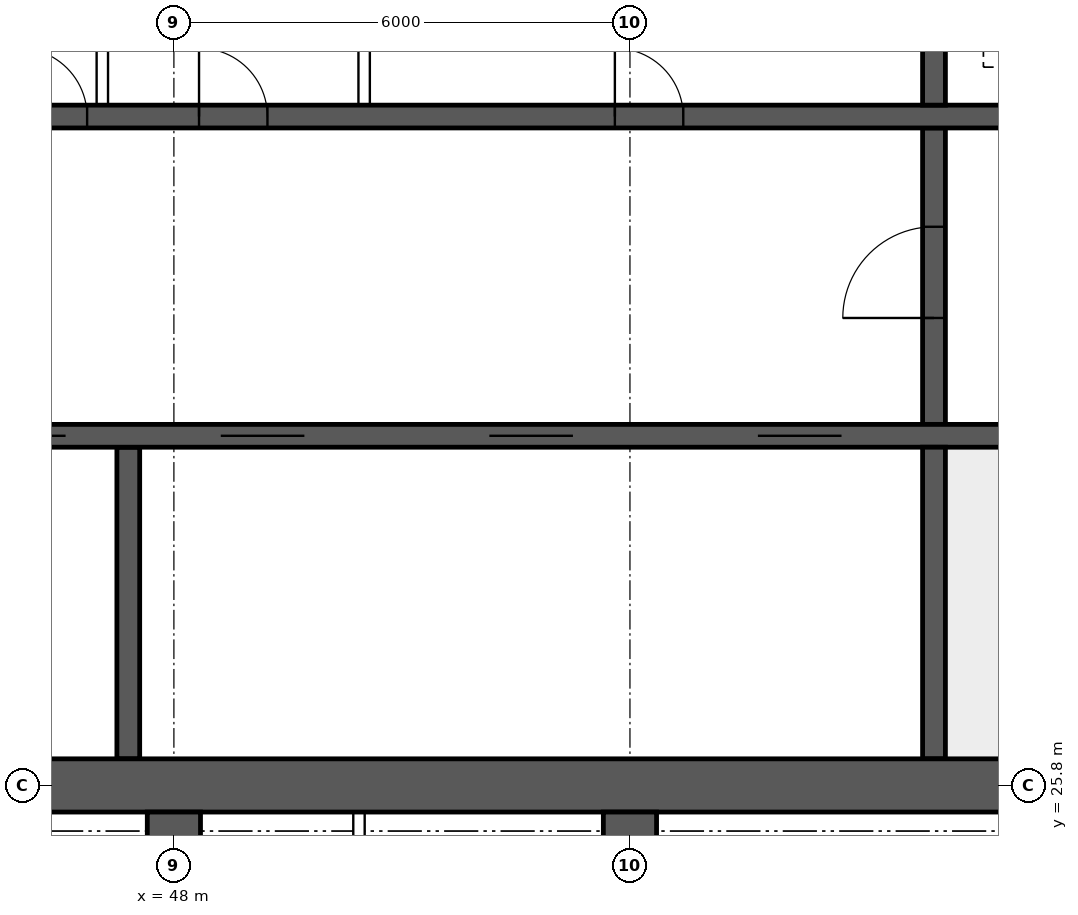
"""IFC4 building model, lengths in metres.
Left out: names, types, materials, properties, quantities, classifications, styles, units other than length and angle.
Written with IfcOpenShell. Run it as: python <this file> out.ifc"""

import sys

from ifc_helpers import new_model, si_unit, direction, frame, frame_2d, origin, place, context, subcontext, project, spatial, rectangle, extrude, element, fill, save


model = new_model("IFC4")
c1 = context("Model", 3, precision=1e-05, world=origin(), true_north=direction((0.0, 1.0)))
c2 = subcontext(c1, "Body", "Model", "MODEL_VIEW")
j1 = project(units=[si_unit("LENGTHUNIT", "METRE"), si_unit("PLANEANGLEUNIT", "RADIAN")], contexts=[c1])
p1 = place(None, origin())
s1 = spatial("IfcSite", under=j1, at=p1, CompositionType="ELEMENT")
p2 = place(p1, origin())
s2 = spatial("IfcBuilding", under=s1, at=p2, CompositionType="ELEMENT")
p3 = place(p2, frame((0.0, 0.0, 208.3)))
s3 = spatial("IfcBuildingStorey", under=s2, at=p3, CompositionType="ELEMENT", Elevation=208.3)
p4 = place(p3, frame((18.0, 25.8, 0.0), z_axis=(0.0, 0.0, 1.0), x_axis=(1.0, 0.0, 0.0)))
e1 = element("IfcWall", 1, at=p4, inside=s3, PredefinedType="SHEAR", context=c2, shape_type="SweptSolid", body=[
    extrude(rectangle(XDim=48.0, YDim=0.7, at=frame_2d((24.0, 0.0))), origin(), (0.0, 0.0, 1.0), 4.5),
])
p5 = place(p3, frame((18.35, 30.4, 0.0), z_axis=(0.0, 0.0, 1.0), x_axis=(1.0, 0.0, 0.0)))
e2 = element("IfcWall", 2, at=p5, inside=s3, PredefinedType="SHEAR", context=c2, shape_type="SweptSolid", body=[
    extrude(rectangle(XDim=47.3, YDim=0.3, at=frame_2d((23.65, 0.0))), origin(), (0.0, 0.0, 1.0), 4.5),
])
p6 = place(p5, frame((0.4, 0.0, 0.0)))
e3 = element("IfcOpeningElement", 3, at=p6, cuts=e2, PredefinedType="OPENING", context=c2, shape_type="SweptSolid", body=[
    extrude(rectangle(XDim=1.0, YDim=2.1, at=frame_2d((0.5, 1.05))), frame((0.0, 0.16, 0.0), z_axis=(0.0, -1.0, 0.0), x_axis=(1.0, 0.0, 0.0)), (0.0, 0.0, 1.0), 0.32),
])
p7 = place(p5, frame((45.9, 0.0, 0.0)))
e4 = element("IfcOpeningElement", 4, at=p7, cuts=e2, PredefinedType="OPENING", context=c2, shape_type="SweptSolid", body=[
    extrude(rectangle(XDim=1.0, YDim=2.1, at=frame_2d((0.5, 1.05))), frame((0.0, 0.16, 0.0), z_axis=(0.0, -1.0, 0.0), x_axis=(1.0, 0.0, 0.0)), (0.0, 0.0, 1.0), 0.32),
])
p8 = place(p5, frame((8.4, 0.0, 0.0)))
e5 = element("IfcOpeningElement", 5, at=p8, cuts=e2, PredefinedType="OPENING", context=c2, shape_type="SweptSolid", body=[
    extrude(rectangle(XDim=1.1, YDim=2.1, at=frame_2d((0.55, 1.05))), frame((0.0, 0.16, 0.0), z_axis=(0.0, -1.0, 0.0), x_axis=(1.0, 0.0, 0.0)), (0.0, 0.0, 1.0), 0.32),
])
p9 = place(p5, frame((11.0, 0.0, 0.0)))
e6 = element("IfcOpeningElement", 6, at=p9, cuts=e2, PredefinedType="OPENING", context=c2, shape_type="SweptSolid", body=[
    extrude(rectangle(XDim=1.1, YDim=2.1, at=frame_2d((0.55, 1.05))), frame((0.0, 0.16, 0.0), z_axis=(0.0, -1.0, 0.0), x_axis=(1.0, 0.0, 0.0)), (0.0, 0.0, 1.0), 0.32),
])
p10 = place(p5, frame((13.6, 0.0, 0.0)))
e7 = element("IfcOpeningElement", 7, at=p10, cuts=e2, PredefinedType="OPENING", context=c2, shape_type="SweptSolid", body=[
    extrude(rectangle(XDim=1.1, YDim=2.1, at=frame_2d((0.55, 1.05))), frame((0.0, 0.16, 0.0), z_axis=(0.0, -1.0, 0.0), x_axis=(1.0, 0.0, 0.0)), (0.0, 0.0, 1.0), 0.32),
])
p11 = place(p5, frame((16.2, 0.0, 0.0)))
e8 = element("IfcOpeningElement", 8, at=p11, cuts=e2, PredefinedType="OPENING", context=c2, shape_type="SweptSolid", body=[
    extrude(rectangle(XDim=1.1, YDim=2.1, at=frame_2d((0.55, 1.05))), frame((0.0, 0.16, 0.0), z_axis=(0.0, -1.0, 0.0), x_axis=(1.0, 0.0, 0.0)), (0.0, 0.0, 1.0), 0.32),
])
p12 = place(p5, frame((18.975, 0.0, 0.0)))
e9 = element("IfcOpeningElement", 9, at=p12, cuts=e2, PredefinedType="OPENING", context=c2, shape_type="SweptSolid", body=[
    extrude(rectangle(XDim=0.9, YDim=2.1, at=frame_2d((0.45, 1.05))), frame((0.0, 0.16, 0.0), z_axis=(0.0, -1.0, 0.0), x_axis=(1.0, 0.0, 0.0)), (0.0, 0.0, 1.0), 0.32),
])
p13 = place(p5, frame((24.375, 0.0, 0.0)))
e10 = element("IfcOpeningElement", 10, at=p13, cuts=e2, PredefinedType="OPENING", context=c2, shape_type="SweptSolid", body=[
    extrude(rectangle(XDim=1.1, YDim=2.1, at=frame_2d((0.55, 1.05))), frame((0.0, 0.16, 0.0), z_axis=(0.0, -1.0, 0.0), x_axis=(1.0, 0.0, 0.0)), (0.0, 0.0, 1.0), 0.32),
])
p14 = place(p5, frame((27.125, 0.0, 0.0)))
e11 = element("IfcOpeningElement", 11, at=p14, cuts=e2, PredefinedType="OPENING", context=c2, shape_type="SweptSolid", body=[
    extrude(rectangle(XDim=1.1, YDim=2.1, at=frame_2d((0.55, 1.05))), frame((0.0, 0.16, 0.0), z_axis=(0.0, -1.0, 0.0), x_axis=(1.0, 0.0, 0.0)), (0.0, 0.0, 1.0), 0.32),
])
p15 = place(p5, frame((30.267, 0.0, 0.0)))
e12 = element("IfcOpeningElement", 12, at=p15, cuts=e2, PredefinedType="OPENING", context=c2, shape_type="SweptSolid", body=[
    extrude(rectangle(XDim=1.1, YDim=2.1, at=frame_2d((0.55, 1.05))), frame((0.0, 0.16, 0.0), z_axis=(0.0, -1.0, 0.0), x_axis=(1.0, 0.0, 0.0)), (0.0, 0.0, 1.0), 0.32),
])
p16 = place(p5, frame((33.8, 0.0, 0.0)))
e13 = element("IfcOpeningElement", 13, at=p16, cuts=e2, PredefinedType="OPENING", context=c2, shape_type="SweptSolid", body=[
    extrude(rectangle(XDim=1.1, YDim=2.1, at=frame_2d((0.55, 1.05))), frame((0.0, 0.16, 0.0), z_axis=(0.0, -1.0, 0.0), x_axis=(1.0, 0.0, 0.0)), (0.0, 0.0, 1.0), 0.32),
])
p17 = place(p5, frame((37.333, 0.0, 0.0)))
e14 = element("IfcOpeningElement", 14, at=p17, cuts=e2, PredefinedType="OPENING", context=c2, shape_type="SweptSolid", body=[
    extrude(rectangle(XDim=1.1, YDim=2.1, at=frame_2d((0.55, 1.05))), frame((0.0, 0.16, 0.0), z_axis=(0.0, -1.0, 0.0), x_axis=(1.0, 0.0, 0.0)), (0.0, 0.0, 1.0), 0.32),
])
p18 = place(p3, frame((18.35, 34.6, 0.0), z_axis=(0.0, 0.0, 1.0), x_axis=(1.0, 0.0, 0.0)))
e15 = element("IfcWall", 15, at=p18, inside=s3, PredefinedType="SHEAR", context=c2, shape_type="SweptSolid", body=[
    extrude(rectangle(XDim=47.3, YDim=0.3, at=frame_2d((23.65, 0.0))), origin(), (0.0, 0.0, 1.0), 4.5),
])
p19 = place(p18, frame((0.9, 0.0, 0.0)))
e16 = element("IfcOpeningElement", 16, at=p19, cuts=e15, PredefinedType="OPENING", context=c2, shape_type="SweptSolid", body=[
    extrude(rectangle(XDim=1.1, YDim=2.1, at=frame_2d((0.55, 1.05))), frame((0.0, 0.16, 0.0), z_axis=(0.0, -1.0, 0.0), x_axis=(1.0, 0.0, 0.0)), (0.0, 0.0, 1.0), 0.32),
])
p20 = place(p18, frame((45.3, 0.0, 0.0)))
e17 = element("IfcOpeningElement", 17, at=p20, cuts=e15, PredefinedType="OPENING", context=c2, shape_type="SweptSolid", body=[
    extrude(rectangle(XDim=1.1, YDim=2.1, at=frame_2d((0.55, 1.05))), frame((0.0, 0.16, 0.0), z_axis=(0.0, -1.0, 0.0), x_axis=(1.0, 0.0, 0.0)), (0.0, 0.0, 1.0), 0.32),
])
p21 = place(p18, frame((4.25, 0.0, 0.0)))
e18 = element("IfcOpeningElement", 18, at=p21, cuts=e15, PredefinedType="OPENING", context=c2, shape_type="SweptSolid", body=[
    extrude(rectangle(XDim=0.9, YDim=2.1, at=frame_2d((0.45, 1.05))), frame((0.0, 0.16, 0.0), z_axis=(0.0, -1.0, 0.0), x_axis=(1.0, 0.0, 0.0)), (0.0, 0.0, 1.0), 0.32),
])
p22 = place(p18, frame((42.15, 0.0, 0.0)))
e19 = element("IfcOpeningElement", 19, at=p22, cuts=e15, PredefinedType="OPENING", context=c2, shape_type="SweptSolid", body=[
    extrude(rectangle(XDim=0.9, YDim=2.1, at=frame_2d((0.45, 1.05))), frame((0.0, 0.16, 0.0), z_axis=(0.0, -1.0, 0.0), x_axis=(1.0, 0.0, 0.0)), (0.0, 0.0, 1.0), 0.32),
])
p23 = place(p18, frame((9.025, 0.0, 0.0)))
e20 = element("IfcOpeningElement", 20, at=p23, cuts=e15, PredefinedType="OPENING", context=c2, shape_type="SweptSolid", body=[
    extrude(rectangle(XDim=0.9, YDim=2.1, at=frame_2d((0.45, 1.05))), frame((0.0, 0.16, 0.0), z_axis=(0.0, -1.0, 0.0), x_axis=(1.0, 0.0, 0.0)), (0.0, 0.0, 1.0), 0.32),
])
p24 = place(p18, frame((12.999, 0.0, 0.0)))
e21 = element("IfcOpeningElement", 21, at=p24, cuts=e15, PredefinedType="OPENING", context=c2, shape_type="SweptSolid", body=[
    extrude(rectangle(XDim=0.9, YDim=2.1, at=frame_2d((0.45, 1.05))), frame((0.0, 0.16, 0.0), z_axis=(0.0, -1.0, 0.0), x_axis=(1.0, 0.0, 0.0)), (0.0, 0.0, 1.0), 0.32),
])
p25 = place(p18, frame((16.646, 0.0, 0.0)))
e22 = element("IfcOpeningElement", 22, at=p25, cuts=e15, PredefinedType="OPENING", context=c2, shape_type="SweptSolid", body=[
    extrude(rectangle(XDim=0.9, YDim=2.1, at=frame_2d((0.45, 1.05))), frame((0.0, 0.16, 0.0), z_axis=(0.0, -1.0, 0.0), x_axis=(1.0, 0.0, 0.0)), (0.0, 0.0, 1.0), 0.32),
])
p26 = place(p18, frame((20.405, 0.0, 0.0)))
e23 = element("IfcOpeningElement", 23, at=p26, cuts=e15, PredefinedType="OPENING", context=c2, shape_type="SweptSolid", body=[
    extrude(rectangle(XDim=0.9, YDim=2.1, at=frame_2d((0.45, 1.05))), frame((0.0, 0.16, 0.0), z_axis=(0.0, -1.0, 0.0), x_axis=(1.0, 0.0, 0.0)), (0.0, 0.0, 1.0), 0.32),
])
p27 = place(p18, frame((24.811, 0.0, 0.0)))
e24 = element("IfcOpeningElement", 24, at=p27, cuts=e15, PredefinedType="OPENING", context=c2, shape_type="SweptSolid", body=[
    extrude(rectangle(XDim=0.9, YDim=2.1, at=frame_2d((0.45, 1.05))), frame((0.0, 0.16, 0.0), z_axis=(0.0, -1.0, 0.0), x_axis=(1.0, 0.0, 0.0)), (0.0, 0.0, 1.0), 0.32),
])
p28 = place(p18, frame((27.608, 0.0, 0.0)))
e25 = element("IfcOpeningElement", 25, at=p28, cuts=e15, PredefinedType="OPENING", context=c2, shape_type="SweptSolid", body=[
    extrude(rectangle(XDim=0.9, YDim=2.1, at=frame_2d((0.45, 1.05))), frame((0.0, 0.16, 0.0), z_axis=(0.0, -1.0, 0.0), x_axis=(1.0, 0.0, 0.0)), (0.0, 0.0, 1.0), 0.32),
])
p29 = place(p18, frame((29.981, 0.0, 0.0)))
e26 = element("IfcOpeningElement", 26, at=p29, cuts=e15, PredefinedType="OPENING", context=c2, shape_type="SweptSolid", body=[
    extrude(rectangle(XDim=0.9, YDim=2.1, at=frame_2d((0.45, 1.05))), frame((0.0, 0.16, 0.0), z_axis=(0.0, -1.0, 0.0), x_axis=(1.0, 0.0, 0.0)), (0.0, 0.0, 1.0), 0.32),
])
p30 = place(p18, frame((35.451, 0.0, 0.0)))
e27 = element("IfcOpeningElement", 27, at=p30, cuts=e15, PredefinedType="OPENING", context=c2, shape_type="SweptSolid", body=[
    extrude(rectangle(XDim=0.9, YDim=2.1, at=frame_2d((0.45, 1.05))), frame((0.0, 0.16, 0.0), z_axis=(0.0, -1.0, 0.0), x_axis=(1.0, 0.0, 0.0)), (0.0, 0.0, 1.0), 0.32),
])
p31 = place(p3, frame((58.0, 26.15, 0.0), z_axis=(0.0, 0.0, 1.0), x_axis=(0.0, 1.0, 0.0)))
e28 = element("IfcWall", 28, at=p31, inside=s3, PredefinedType="SHEAR", context=c2, shape_type="SweptSolid", body=[
    extrude(rectangle(XDim=4.1, YDim=0.3, at=frame_2d((2.05, 0.0))), origin(), (0.0, 0.0, 1.0), 4.5),
])
p32 = place(p3, frame((58.0, 30.55, 0.0), z_axis=(0.0, 0.0, 1.0), x_axis=(0.0, 1.0, 0.0)))
e29 = element("IfcWall", 29, at=p32, inside=s3, PredefinedType="SHEAR", context=c2, shape_type="SweptSolid", body=[
    extrude(rectangle(XDim=3.9, YDim=0.3, at=frame_2d((1.95, 0.0))), origin(), (0.0, 0.0, 1.0), 4.5),
])
p33 = place(p32, frame((1.4, 0.0, 0.0)))
e30 = element("IfcOpeningElement", 30, at=p33, cuts=e29, PredefinedType="OPENING", context=c2, shape_type="SweptSolid", body=[
    extrude(rectangle(XDim=1.2, YDim=2.1, at=frame_2d((0.6, 1.05))), frame((0.0, 0.16, 0.0), z_axis=(0.0, -1.0, 0.0), x_axis=(1.0, 0.0, 0.0)), (0.0, 0.0, 1.0), 0.32),
])
p34 = place(p3, frame((58.0, 34.75, 0.0), z_axis=(0.0, 0.0, 1.0), x_axis=(0.0, 1.0, 0.0)))
e31 = element("IfcWall", 31, at=p34, inside=s3, PredefinedType="SHEAR", context=c2, shape_type="SweptSolid", body=[
    extrude(rectangle(XDim=3.1, YDim=0.3, at=frame_2d((1.55, 0.0))), origin(), (0.0, 0.0, 1.0), 4.5),
])
p35 = place(p3, frame((47.4, 26.15, 0.0), z_axis=(0.0, 0.0, 1.0), x_axis=(0.0, 1.0, 0.0)))
e32 = element("IfcWall", 32, at=p35, inside=s3, PredefinedType="SHEAR", context=c2, shape_type="SweptSolid", body=[
    extrude(rectangle(XDim=4.1, YDim=0.3, at=frame_2d((2.05, 0.0))), origin(), (0.0, 0.0, 1.0), 4.5),
])
for number, where, z_axis, x_axis in (
    (33, (48.0, 18.4, 0.0), (0.0, 0.0, 1.0), (0.0, 1.0, 0.0)),
    (34, (54.0, 18.4, 0.0), (0.0, 0.0, 1.0), (0.0, 1.0, 0.0)),
):
    element("IfcWall", number, at=place(p3, frame(where, z_axis=z_axis, x_axis=x_axis)), inside=s3, PredefinedType="SHEAR", context=c2, shape_type="SweptSolid", body=[
        extrude(rectangle(XDim=7.05, YDim=0.7, at=frame_2d((3.525, 0.0))), origin(), (0.0, 0.0, 1.0), 4.5),
    ])
for number, where, z_axis, x_axis in (
    (35, (47.058, 34.75, 0.0), (0.0, 0.0, 1.0), (0.0, 1.0, 0.0)),
    (36, (50.503, 34.75, 0.0), (0.0, 0.0, 1.0), (0.0, 1.0, 0.0)),
):
    element("IfcWall", number, at=place(p3, frame(where, z_axis=z_axis, x_axis=x_axis)), inside=s3, PredefinedType="SOLIDWALL", context=c2, shape_type="SweptSolid", body=[
        extrude(rectangle(XDim=3.1, YDim=0.15, at=frame_2d((1.55, 0.0))), origin(), (0.0, 0.0, 1.0), 4.25),
    ])
p36 = place(p3, frame((50.435, 18.5, 0.0), z_axis=(0.0, 0.0, 1.0), x_axis=(0.0, 1.0, 0.0)))
e37 = element("IfcWall", 37, at=p36, inside=s3, PredefinedType="PARTITIONING", context=c2, shape_type="SweptSolid", body=[
    extrude(rectangle(XDim=6.95, YDim=0.15, at=frame_2d((3.475, 0.0))), origin(), (0.0, 0.0, 1.0), 4.25),
])
p37 = place(p33, origin())
e38 = element("IfcDoor", 38, at=p37, inside=s3, OperationType="SINGLE_SWING_LEFT", PredefinedType="DOOR", context=c2, shape_type="SweptSolid", body=[
    extrude(rectangle(XDim=1.2, YDim=2.1, at=frame_2d((0.6, 1.05))), frame((0.0, 0.025, 0.0), z_axis=(0.0, -1.0, 0.0), x_axis=(1.0, 0.0, 0.0)), (0.0, 0.0, 1.0), 0.05),
])
fill(e30, e38)
p38 = place(p28, origin())
e39 = element("IfcDoor", 39, at=p38, inside=s3, OperationType="SINGLE_SWING_LEFT", PredefinedType="DOOR", context=c2, shape_type="SweptSolid", body=[
    extrude(rectangle(XDim=0.9, YDim=2.1, at=frame_2d((0.45, 1.05))), frame((0.0, 0.025, 0.0), z_axis=(0.0, -1.0, 0.0), x_axis=(1.0, 0.0, 0.0)), (0.0, 0.0, 1.0), 0.05),
])
fill(e25, e39)
p39 = place(p29, origin())
e40 = element("IfcDoor", 40, at=p39, inside=s3, OperationType="SINGLE_SWING_LEFT", PredefinedType="DOOR", context=c2, shape_type="SweptSolid", body=[
    extrude(rectangle(XDim=0.9, YDim=2.1, at=frame_2d((0.45, 1.05))), frame((0.0, 0.025, 0.0), z_axis=(0.0, -1.0, 0.0), x_axis=(1.0, 0.0, 0.0)), (0.0, 0.0, 1.0), 0.05),
])
fill(e26, e40)
p40 = place(p30, origin())
e41 = element("IfcDoor", 41, at=p40, inside=s3, OperationType="SINGLE_SWING_LEFT", PredefinedType="DOOR", context=c2, shape_type="SweptSolid", body=[
    extrude(rectangle(XDim=0.9, YDim=2.1, at=frame_2d((0.45, 1.05))), frame((0.0, 0.025, 0.0), z_axis=(0.0, -1.0, 0.0), x_axis=(1.0, 0.0, 0.0)), (0.0, 0.0, 1.0), 0.05),
])
fill(e27, e41)
p41 = place(p14, origin())
e42 = element("IfcDoor", 42, at=p41, inside=s3, OperationType="DOUBLE_DOOR_SLIDING", PredefinedType="DOOR", context=c2, shape_type="SweptSolid", body=[
    extrude(rectangle(XDim=1.1, YDim=2.1, at=frame_2d((0.55, 1.05))), frame((0.0, 0.025, 0.0), z_axis=(0.0, -1.0, 0.0), x_axis=(1.0, 0.0, 0.0)), (0.0, 0.0, 1.0), 0.05),
])
fill(e11, e42)
p42 = place(p15, origin())
e43 = element("IfcDoor", 43, at=p42, inside=s3, OperationType="DOUBLE_DOOR_SLIDING", PredefinedType="DOOR", context=c2, shape_type="SweptSolid", body=[
    extrude(rectangle(XDim=1.1, YDim=2.1, at=frame_2d((0.55, 1.05))), frame((0.0, 0.025, 0.0), z_axis=(0.0, -1.0, 0.0), x_axis=(1.0, 0.0, 0.0)), (0.0, 0.0, 1.0), 0.05),
])
fill(e12, e43)
p43 = place(p16, origin())
e44 = element("IfcDoor", 44, at=p43, inside=s3, OperationType="DOUBLE_DOOR_SLIDING", PredefinedType="DOOR", context=c2, shape_type="SweptSolid", body=[
    extrude(rectangle(XDim=1.1, YDim=2.1, at=frame_2d((0.55, 1.05))), frame((0.0, 0.025, 0.0), z_axis=(0.0, -1.0, 0.0), x_axis=(1.0, 0.0, 0.0)), (0.0, 0.0, 1.0), 0.05),
])
fill(e13, e44)
p44 = place(p17, origin())
e45 = element("IfcDoor", 45, at=p44, inside=s3, OperationType="DOUBLE_DOOR_SLIDING", PredefinedType="DOOR", context=c2, shape_type="SweptSolid", body=[
    extrude(rectangle(XDim=1.1, YDim=2.1, at=frame_2d((0.55, 1.05))), frame((0.0, 0.025, 0.0), z_axis=(0.0, -1.0, 0.0), x_axis=(1.0, 0.0, 0.0)), (0.0, 0.0, 1.0), 0.05),
])
fill(e14, e45)
save(model, sys.argv[1])
